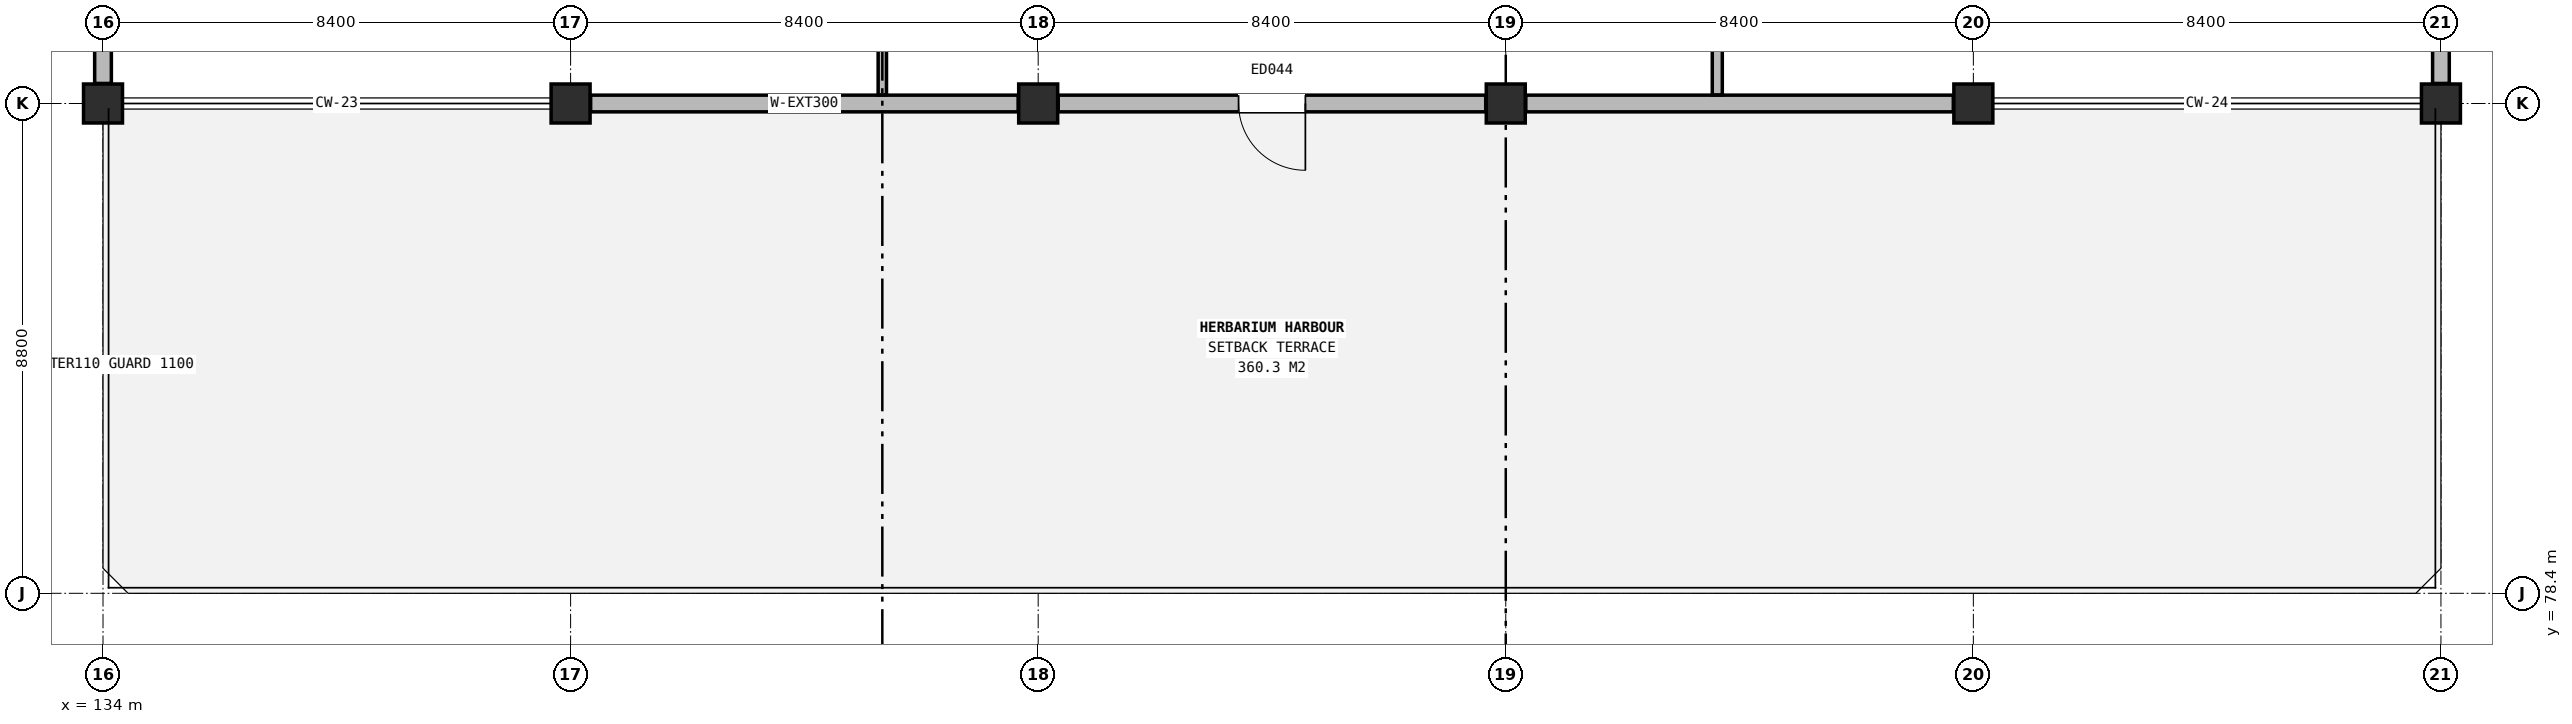
"""IFC4 building model, lengths in metres.
Left out: names, types, materials, properties, quantities, classifications, styles, units other than length and angle.
Written with IfcOpenShell. Run it as: python <this file> out.ifc"""

import sys

from ifc_helpers import new_model, si_unit, direction, frame, frame_2d, origin, origin_2d, place, context, subcontext, project, spatial, rectangle, extrude, element, fill, save


model = new_model("IFC4")
c1 = context("Model", 3, precision=1e-05, world=origin(), true_north=direction((0.0, 1.0)))
c2 = subcontext(c1, "Body", "Model", "MODEL_VIEW")
j1 = project(units=[si_unit("LENGTHUNIT", "METRE"), si_unit("PLANEANGLEUNIT", "RADIAN")], contexts=[c1])
p1 = place(None, origin())
s1 = spatial("IfcSite", under=j1, at=p1, CompositionType="ELEMENT")
p2 = place(p1, origin())
s2 = spatial("IfcBuilding", under=s1, at=p2, CompositionType="ELEMENT")
p3 = place(p2, frame((0.0, 0.0, 24.8)))
s3 = spatial("IfcBuildingStorey", under=s2, at=p3, CompositionType="ELEMENT", Elevation=24.8)
for number, where, z_axis, x_axis in (
    (1, (134.0, 87.2, 0.0), (0.0, 0.0, 1.0), (1.0, 0.0, 0.0)),
    (2, (142.4, 87.2, 0.0), (0.0, 0.0, 1.0), (1.0, 0.0, 0.0)),
    (3, (150.8, 87.2, 0.0), (0.0, 0.0, 1.0), (1.0, 0.0, 0.0)),
    (4, (159.2, 87.2, 0.0), (0.0, 0.0, 1.0), (1.0, 0.0, 0.0)),
    (5, (167.6, 87.2, 0.0), (0.0, 0.0, 1.0), (1.0, 0.0, 0.0)),
    (6, (176.0, 87.2, 0.0), (0.0, 0.0, 1.0), (1.0, 0.0, 0.0)),
):
    element("IfcColumn", number, at=place(p3, frame(where, z_axis=z_axis, x_axis=x_axis)), inside=s3, PredefinedType="COLUMN", context=c2, shape_type="SweptSolid", body=[
        extrude(rectangle(XDim=0.7, YDim=0.7, at=origin_2d()), origin(), (0.0, 0.0, 1.0), 4.0),
    ])
p4 = place(p3, frame((142.76, 87.2, 0.0), z_axis=(0.0, 0.0, 1.0), x_axis=(1.0, 0.0, 0.0)))
e7 = element("IfcWall", 7, at=p4, inside=s3, PredefinedType="SOLIDWALL", context=c2, shape_type="SweptSolid", body=[
    extrude(rectangle(XDim=7.68, YDim=0.3, at=frame_2d((3.84, 0.0))), origin(), (0.0, 0.0, 1.0), 3.15),
])
p5 = place(p3, frame((151.16, 87.2, 0.0), z_axis=(0.0, 0.0, 1.0), x_axis=(1.0, 0.0, 0.0)))
e8 = element("IfcWall", 8, at=p5, inside=s3, PredefinedType="SOLIDWALL", context=c2, shape_type="SweptSolid", body=[
    extrude(rectangle(XDim=7.68, YDim=0.3, at=frame_2d((3.84, 0.0))), origin(), (0.0, 0.0, 1.0), 3.15),
])
p6 = place(p5, frame((3.24, 0.0, 0.0)))
e9 = element("IfcOpeningElement", 9, at=p6, cuts=e8, PredefinedType="OPENING", context=c2, shape_type="SweptSolid", body=[
    extrude(rectangle(XDim=1.2, YDim=2.25, at=frame_2d((0.6, 1.125))), frame((0.0, 0.16, 0.0), z_axis=(0.0, -1.0, 0.0), x_axis=(1.0, 0.0, 0.0)), (0.0, 0.0, 1.0), 0.32),
])
p7 = place(p3, frame((159.56, 87.2, 0.0), z_axis=(0.0, 0.0, 1.0), x_axis=(1.0, 0.0, 0.0)))
e10 = element("IfcWall", 10, at=p7, inside=s3, PredefinedType="SOLIDWALL", context=c2, shape_type="SweptSolid", body=[
    extrude(rectangle(XDim=7.68, YDim=0.3, at=frame_2d((3.84, 0.0))), origin(), (0.0, 0.0, 1.0), 3.15),
])
p8 = place(p3, frame((176.0, 87.56, 0.0), z_axis=(0.0, 0.0, 1.0), x_axis=(0.0, 1.0, 0.0)))
e11 = element("IfcWall", 11, at=p8, inside=s3, PredefinedType="SOLIDWALL", context=c2, shape_type="SweptSolid", body=[
    extrude(rectangle(XDim=8.08, YDim=0.3, at=frame_2d((4.04, 0.0))), origin(), (0.0, 0.0, 1.0), 3.15),
])
p9 = place(p8, frame((2.44, 0.0, 0.9)))
e12 = element("IfcOpeningElement", 12, at=p9, cuts=e11, PredefinedType="OPENING", context=c2, shape_type="SweptSolid", body=[
    extrude(rectangle(XDim=3.2, YDim=2.1, at=frame_2d((1.6, 1.05))), frame((0.0, 0.16, 0.0), z_axis=(0.0, -1.0, 0.0), x_axis=(1.0, 0.0, 0.0)), (0.0, 0.0, 1.0), 0.32),
])
p10 = place(p3, frame((134.0, 95.64, 0.0), z_axis=(0.0, 0.0, 1.0), x_axis=(0.0, -1.0, 0.0)))
e13 = element("IfcWall", 13, at=p10, inside=s3, PredefinedType="SOLIDWALL", context=c2, shape_type="SweptSolid", body=[
    extrude(rectangle(XDim=8.08, YDim=0.3, at=frame_2d((4.04, 0.0))), origin(), (0.0, 0.0, 1.0), 3.15),
])
p11 = place(p10, frame((2.93, 0.0, 0.9)))
e14 = element("IfcOpeningElement", 14, at=p11, cuts=e13, PredefinedType="OPENING", context=c2, shape_type="SweptSolid", body=[
    extrude(rectangle(XDim=2.22, YDim=2.08, at=frame_2d((1.11, 1.04))), frame((0.0, 0.16, 0.0), z_axis=(0.0, -1.0, 0.0), x_axis=(1.0, 0.0, 0.0)), (0.0, 0.0, 1.0), 0.32),
])
p12 = place(p3, frame((148.0, 87.355, 0.0), z_axis=(0.0, 0.0, 1.0), x_axis=(0.0, 1.0, 0.0)))
e15 = element("IfcWall", 15, at=p12, inside=s3, PredefinedType="PARTITIONING", context=c2, shape_type="SweptSolid", body=[
    extrude(rectangle(XDim=14.965, YDim=0.15, at=frame_2d((7.482, 0.0))), origin(), (0.0, 0.0, 1.0), 3.665),
])
p13 = place(p3, frame((163.0, 87.355, 0.0), z_axis=(0.0, 0.0, 1.0), x_axis=(0.0, 1.0, 0.0)))
e16 = element("IfcWall", 16, at=p13, inside=s3, PredefinedType="PARTITIONING", context=c2, shape_type="SweptSolid", body=[
    extrude(rectangle(XDim=14.95, YDim=0.18, at=frame_2d((7.475, 0.0))), origin(), (0.0, 0.0, 1.0), 3.665),
])
p14 = place(p6, frame((1.2, 0.0, 0.0), z_axis=(0.0, 0.0, 1.0), x_axis=(-1.0, 0.0, 0.0)))
e17 = element("IfcDoor", 17, at=p14, inside=s3, OperationType="SINGLE_SWING_RIGHT", PredefinedType="DOOR", context=c2, shape_type="SweptSolid", body=[
    extrude(rectangle(XDim=1.2, YDim=2.25, at=frame_2d((0.6, 1.125))), frame((0.0, 0.025, 0.0), z_axis=(0.0, -1.0, 0.0), x_axis=(1.0, 0.0, 0.0)), (0.0, 0.0, 1.0), 0.05),
])
fill(e9, e17)
save(model, sys.argv[1])
